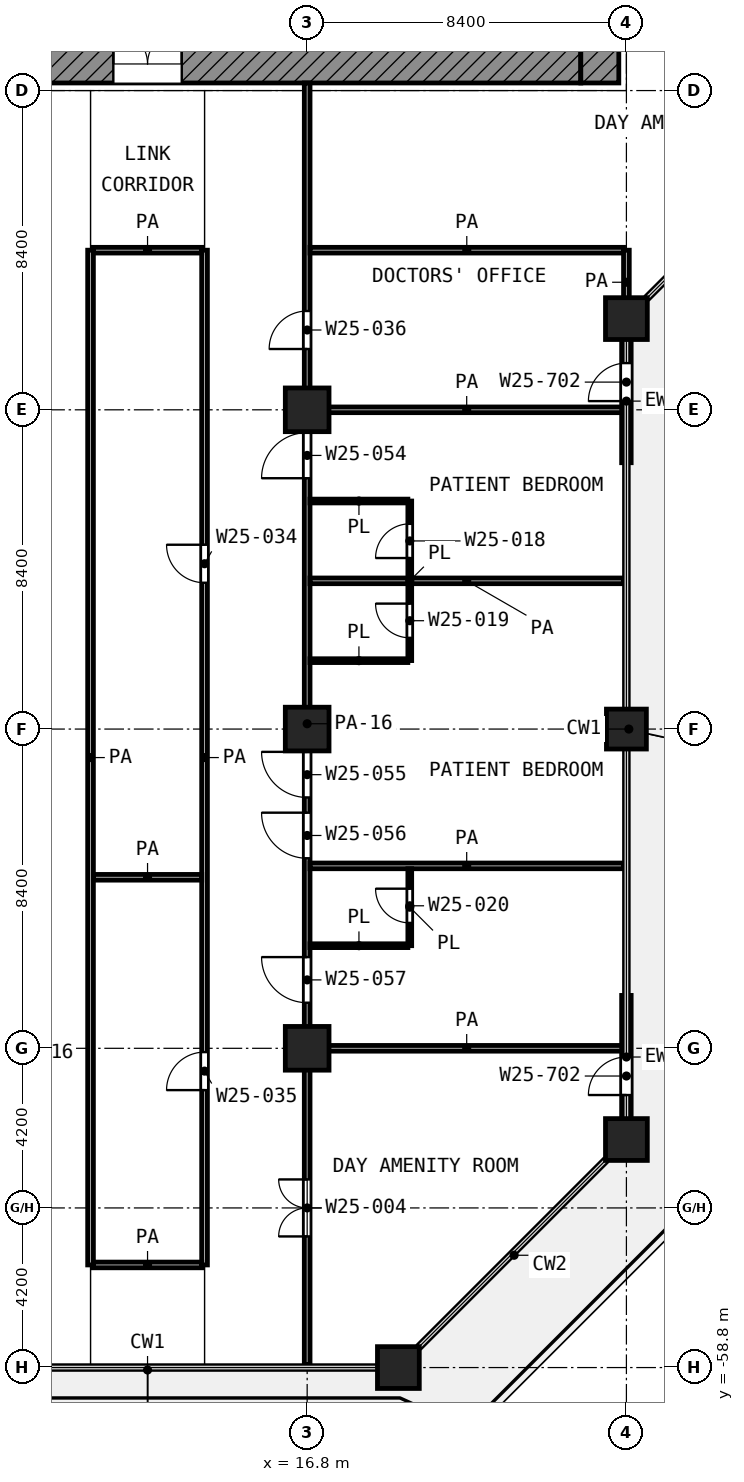
"""IFC4 building model, lengths in metres.
Left out: names, types, materials, properties, quantities, classifications, styles, units other than length and angle.
Written with IfcOpenShell. Run it as: python <this file> out.ifc"""

import sys

from ifc_helpers import new_model, si_unit, direction, frame, frame_2d, origin, origin_2d, place, context, subcontext, project, spatial, rectangle, extrude, element, fill, save


model = new_model("IFC4")
c1 = context("Model", 3, precision=1e-05, world=origin(), true_north=direction((0.0, 1.0)))
c2 = subcontext(c1, "Body", "Model", "MODEL_VIEW")
j1 = project(units=[si_unit("LENGTHUNIT", "METRE"), si_unit("PLANEANGLEUNIT", "RADIAN")], contexts=[c1])
p1 = place(None, origin())
s1 = spatial("IfcSite", under=j1, at=p1, CompositionType="ELEMENT")
p2 = place(p1, origin())
s2 = spatial("IfcBuilding", under=s1, at=p2, CompositionType="ELEMENT")
p3 = place(p2, frame((0.0, 0.0, 111.4)))
s3 = spatial("IfcBuildingStorey", under=s2, at=p3, CompositionType="ELEMENT", Elevation=111.4)
p4 = place(p3, frame((25.2, -31.2, 0.0), z_axis=(0.0, 0.0, 1.0), x_axis=(1.0, 0.0, 0.0)))
e1 = element("IfcColumn", 1, at=p4, inside=s3, PredefinedType="COLUMN", context=c2, shape_type="SweptSolid", body=[
    extrude(rectangle(XDim=1.1, YDim=1.1, at=origin_2d()), origin(), (0.0, 0.0, 1.0), 4.2),
])
for number, where, z_axis, x_axis in (
    (2, (16.8, -33.6, 0.0), (0.0, 0.0, 1.0), (1.0, 0.0, 0.0)),
    (3, (16.8, -42.0, 0.0), (0.0, 0.0, 1.0), (1.0, 0.0, 0.0)),
):
    element("IfcColumn", number, at=place(p3, frame(where, z_axis=z_axis, x_axis=x_axis)), inside=s3, PredefinedType="COLUMN", context=c2, shape_type="SweptSolid", body=[
        extrude(rectangle(XDim=1.15, YDim=1.15, at=origin_2d()), origin(), (0.0, 0.0, 1.0), 4.2),
    ])
p5 = place(p3, frame((25.2, -42.0, 0.0), z_axis=(0.0, 0.0, 1.0), x_axis=(1.0, 0.0, 0.0)))
e4 = element("IfcColumn", 4, at=p5, inside=s3, PredefinedType="COLUMN", context=c2, shape_type="SweptSolid", body=[
    extrude(rectangle(XDim=1.05, YDim=1.05, at=origin_2d()), origin(), (0.0, 0.0, 1.0), 4.2),
])
p6 = place(p3, frame((16.8, -50.4, 0.0), z_axis=(0.0, 0.0, 1.0), x_axis=(1.0, 0.0, 0.0)))
e5 = element("IfcColumn", 5, at=p6, inside=s3, PredefinedType="COLUMN", context=c2, shape_type="SweptSolid", body=[
    extrude(rectangle(XDim=1.15, YDim=1.15, at=origin_2d()), origin(), (0.0, 0.0, 1.0), 4.2),
])
for number, where, z_axis, x_axis in (
    (6, (25.2, -52.8, 0.0), (0.0, 0.0, 1.0), (1.0, 0.0, 0.0)),
    (7, (19.2, -58.8, 0.0), (0.0, 0.0, 1.0), (1.0, 0.0, 0.0)),
):
    element("IfcColumn", number, at=place(p3, frame(where, z_axis=z_axis, x_axis=x_axis)), inside=s3, PredefinedType="COLUMN", context=c2, shape_type="SweptSolid", body=[
        extrude(rectangle(XDim=1.1, YDim=1.1, at=origin_2d()), origin(), (0.0, 0.0, 1.0), 4.2),
    ])
p7 = place(p3, frame((25.2, -52.25, 0.0), z_axis=(0.0, 0.0, 1.0), x_axis=(0.0, 1.0, 0.0)))
e8 = element("IfcWall", 8, at=p7, inside=s3, PredefinedType="SOLIDWALL", context=c2, shape_type="SweptSolid", body=[
    extrude(rectangle(XDim=3.242, YDim=0.25, at=frame_2d((1.621, 0.0))), origin(), (0.0, 0.0, 1.0), 3.48),
])
p8 = place(p7, frame((0.621, 0.0, 0.0)))
e9 = element("IfcOpeningElement", 9, at=p8, cuts=e8, PredefinedType="OPENING", context=c2, shape_type="SweptSolid", body=[
    extrude(rectangle(XDim=1.0, YDim=2.1, at=frame_2d((0.5, 1.05))), frame((0.0, 0.135, 0.0), z_axis=(0.0, -1.0, 0.0), x_axis=(1.0, 0.0, 0.0)), (0.0, 0.0, 1.0), 0.27),
])
p9 = place(p3, frame((25.2, -34.992, 0.0), z_axis=(0.0, 0.0, 1.0), x_axis=(0.0, 1.0, 0.0)))
e10 = element("IfcWall", 10, at=p9, inside=s3, PredefinedType="SOLIDWALL", context=c2, shape_type="SweptSolid", body=[
    extrude(rectangle(XDim=3.242, YDim=0.25, at=frame_2d((1.621, 0.0))), origin(), (0.0, 0.0, 1.0), 3.48),
])
p10 = place(p9, frame((1.621, 0.0, 0.0)))
e11 = element("IfcOpeningElement", 11, at=p10, cuts=e10, PredefinedType="OPENING", context=c2, shape_type="SweptSolid", body=[
    extrude(rectangle(XDim=1.0, YDim=2.1, at=frame_2d((0.5, 1.05))), frame((0.0, 0.135, 0.0), z_axis=(0.0, -1.0, 0.0), x_axis=(1.0, 0.0, 0.0)), (0.0, 0.0, 1.0), 0.27),
])
p11 = place(p3, frame((5.4, -24.5, 0.0), z_axis=(0.0, 0.0, 1.0), x_axis=(1.0, 0.0, 0.0)))
e12 = element("IfcWall", 12, at=p11, inside=s3, PredefinedType="SHEAR", context=c2, shape_type="SweptSolid", body=[
    extrude(rectangle(XDim=18.6, YDim=1.0, at=frame_2d((9.3, 0.0))), origin(), (0.0, 0.0, 1.0), 3.6),
])
p12 = place(p11, frame((6.3, 0.0, 0.0)))
e13 = element("IfcOpeningElement", 13, at=p12, cuts=e12, PredefinedType="OPENING", context=c2, shape_type="SweptSolid", body=[
    extrude(rectangle(XDim=1.8, YDim=2.1, at=frame_2d((0.9, 1.05))), frame((0.0, 0.51, 0.0), z_axis=(0.0, -1.0, 0.0), x_axis=(1.0, 0.0, 0.0)), (0.0, 0.0, 1.0), 1.02),
])
p13 = place(p3, frame((24.5, -25.0, 0.0), z_axis=(0.0, 0.0, 1.0), x_axis=(0.0, 1.0, 0.0)))
e14 = element("IfcWall", 14, at=p13, inside=s3, PredefinedType="SHEAR", context=c2, shape_type="SweptSolid", body=[
    extrude(rectangle(XDim=1.0, YDim=1.0, at=frame_2d((0.5, 0.0))), origin(), (0.0, 0.0, 1.0), 3.6),
])
p14 = place(p3, frame((16.875, -47.7, 0.0), z_axis=(0.0, 0.0, 1.0), x_axis=(1.0, 0.0, 0.0)))
e15 = element("IfcWall", 15, at=p14, inside=s3, PredefinedType="PARTITIONING", context=c2, shape_type="SweptSolid", body=[
    extrude(rectangle(XDim=2.575, YDim=0.1, at=frame_2d((1.288, 0.0))), origin(), (0.0, 0.0, 1.0), 3.6),
])
p15 = place(p3, frame((16.875, -40.2, 0.0), z_axis=(0.0, 0.0, 1.0), x_axis=(1.0, 0.0, 0.0)))
e16 = element("IfcWall", 16, at=p15, inside=s3, PredefinedType="PARTITIONING", context=c2, shape_type="SweptSolid", body=[
    extrude(rectangle(XDim=2.574, YDim=0.1, at=frame_2d((1.287, 0.0))), origin(), (0.0, 0.0, 1.0), 3.6),
])
p16 = place(p3, frame((16.875, -36.0, 0.0), z_axis=(0.0, 0.0, 1.0), x_axis=(1.0, 0.0, 0.0)))
e17 = element("IfcWall", 17, at=p16, inside=s3, PredefinedType="PARTITIONING", context=c2, shape_type="SweptSolid", body=[
    extrude(rectangle(XDim=2.575, YDim=0.1, at=frame_2d((1.288, 0.0))), origin(), (0.0, 0.0, 1.0), 3.6),
])
p17 = place(p3, frame((19.5, -47.7, 0.0), z_axis=(0.0, 0.0, 1.0), x_axis=(0.0, 1.0, 0.0)))
e18 = element("IfcWall", 18, at=p17, inside=s3, PredefinedType="PARTITIONING", context=c2, shape_type="SweptSolid", body=[
    extrude(rectangle(XDim=2.025, YDim=0.1, at=frame_2d((1.012, 0.0))), origin(), (0.0, 0.0, 1.0), 3.6),
])
p18 = place(p17, frame((0.6, 0.0, 0.0)))
e19 = element("IfcOpeningElement", 19, at=p18, cuts=e18, PredefinedType="OPENING", context=c2, shape_type="SweptSolid", body=[
    extrude(rectangle(XDim=0.9, YDim=2.1, at=frame_2d((0.45, 1.05))), frame((0.0, 0.06, 0.0), z_axis=(0.0, -1.0, 0.0), x_axis=(1.0, 0.0, 0.0)), (0.0, 0.0, 1.0), 0.12),
])
p19 = place(p3, frame((19.5, -40.198, 0.0), z_axis=(0.0, 0.0, 1.0), x_axis=(0.0, 1.0, 0.0)))
e20 = element("IfcWall", 20, at=p19, inside=s3, PredefinedType="PARTITIONING", context=c2, shape_type="SweptSolid", body=[
    extrude(rectangle(XDim=4.198, YDim=0.1, at=frame_2d((2.099, 0.0))), origin(), (0.0, 0.0, 1.0), 3.6),
])
p20 = place(p19, frame((2.698, 0.0, 0.0)))
e21 = element("IfcOpeningElement", 21, at=p20, cuts=e20, PredefinedType="OPENING", context=c2, shape_type="SweptSolid", body=[
    extrude(rectangle(XDim=0.9, YDim=2.1, at=frame_2d((0.45, 1.05))), frame((0.0, 0.06, 0.0), z_axis=(0.0, -1.0, 0.0), x_axis=(1.0, 0.0, 0.0)), (0.0, 0.0, 1.0), 0.12),
])
p21 = place(p19, frame((0.599, 0.0, 0.0)))
e22 = element("IfcOpeningElement", 22, at=p21, cuts=e20, PredefinedType="OPENING", context=c2, shape_type="SweptSolid", body=[
    extrude(rectangle(XDim=0.9, YDim=2.1, at=frame_2d((0.45, 1.05))), frame((0.0, 0.06, 0.0), z_axis=(0.0, -1.0, 0.0), x_axis=(1.0, 0.0, 0.0)), (0.0, 0.0, 1.0), 0.12),
])
p22 = place(p3, frame((11.175, -56.1, 0.0), z_axis=(0.0, 0.0, 1.0), x_axis=(1.0, 0.0, 0.0)))
e23 = element("IfcWall", 23, at=p22, inside=s3, PredefinedType="PARTITIONING", context=c2, shape_type="SweptSolid", body=[
    extrude(rectangle(XDim=2.85, YDim=0.15, at=frame_2d((1.425, 0.0))), origin(), (0.0, 0.0, 1.0), 3.6),
])
p23 = place(p3, frame((16.875, -50.4, 0.0), z_axis=(0.0, 0.0, 1.0), x_axis=(1.0, 0.0, 0.0)))
e24 = element("IfcWall", 24, at=p23, inside=s3, PredefinedType="PARTITIONING", context=c2, shape_type="SweptSolid", body=[
    extrude(rectangle(XDim=8.245, YDim=0.15, at=frame_2d((4.123, 0.0))), origin(), (0.0, 0.0, 1.0), 3.6),
])
p24 = place(p3, frame((11.175, -45.9, 0.0), z_axis=(0.0, 0.0, 1.0), x_axis=(1.0, 0.0, 0.0)))
e25 = element("IfcWall", 25, at=p24, inside=s3, PredefinedType="PARTITIONING", context=c2, shape_type="SweptSolid", body=[
    extrude(rectangle(XDim=2.85, YDim=0.15, at=frame_2d((1.425, 0.0))), origin(), (0.0, 0.0, 1.0), 3.6),
])
for number, where, z_axis, x_axis in (
    (26, (16.875, -45.6, 0.0), (0.0, 0.0, 1.0), (1.0, 0.0, 0.0)),
    (27, (16.875, -38.1, 0.0), (0.0, 0.0, 1.0), (1.0, 0.0, 0.0)),
    (28, (16.875, -33.6, 0.0), (0.0, 0.0, 1.0), (1.0, 0.0, 0.0)),
):
    element("IfcWall", number, at=place(p3, frame(where, z_axis=z_axis, x_axis=x_axis)), inside=s3, PredefinedType="PARTITIONING", context=c2, shape_type="SweptSolid", body=[
        extrude(rectangle(XDim=8.245, YDim=0.15, at=frame_2d((4.123, 0.0))), origin(), (0.0, 0.0, 1.0), 3.6),
    ])
p25 = place(p3, frame((11.175, -29.4, 0.0), z_axis=(0.0, 0.0, 1.0), x_axis=(1.0, 0.0, 0.0)))
e29 = element("IfcWall", 29, at=p25, inside=s3, PredefinedType="PARTITIONING", context=c2, shape_type="SweptSolid", body=[
    extrude(rectangle(XDim=2.85, YDim=0.15, at=frame_2d((1.425, 0.0))), origin(), (0.0, 0.0, 1.0), 3.6),
])
p26 = place(p3, frame((16.875, -29.4, 0.0), z_axis=(0.0, 0.0, 1.0), x_axis=(1.0, 0.0, 0.0)))
e30 = element("IfcWall", 30, at=p26, inside=s3, PredefinedType="PARTITIONING", context=c2, shape_type="SweptSolid", body=[
    extrude(rectangle(XDim=8.25, YDim=0.15, at=frame_2d((4.125, 0.0))), origin(), (0.0, 0.0, 1.0), 3.6),
])
p27 = place(p3, frame((11.1, -56.1, 0.0), z_axis=(0.0, 0.0, 1.0), x_axis=(0.0, 1.0, 0.0)))
e31 = element("IfcWall", 31, at=p27, inside=s3, PredefinedType="PARTITIONING", context=c2, shape_type="SweptSolid", body=[
    extrude(rectangle(XDim=26.7, YDim=0.15, at=frame_2d((13.35, 0.0))), origin(), (0.0, 0.0, 1.0), 3.6),
])
p28 = place(p3, frame((14.1, -56.1, 0.0), z_axis=(0.0, 0.0, 1.0), x_axis=(0.0, 1.0, 0.0)))
e32 = element("IfcWall", 32, at=p28, inside=s3, PredefinedType="PARTITIONING", context=c2, shape_type="SweptSolid", body=[
    extrude(rectangle(XDim=26.7, YDim=0.15, at=frame_2d((13.35, 0.0))), origin(), (0.0, 0.0, 1.0), 3.6),
])
p29 = place(p28, frame((17.95, 0.0, 0.0)))
e33 = element("IfcOpeningElement", 33, at=p29, cuts=e32, PredefinedType="OPENING", context=c2, shape_type="SweptSolid", body=[
    extrude(rectangle(XDim=1.0, YDim=2.1, at=frame_2d((0.5, 1.05))), frame((0.0, 0.085, 0.0), z_axis=(0.0, -1.0, 0.0), x_axis=(1.0, 0.0, 0.0)), (0.0, 0.0, 1.0), 0.17),
])
p30 = place(p28, frame((4.6, 0.0, 0.0)))
e34 = element("IfcOpeningElement", 34, at=p30, cuts=e32, PredefinedType="OPENING", context=c2, shape_type="SweptSolid", body=[
    extrude(rectangle(XDim=1.0, YDim=2.1, at=frame_2d((0.5, 1.05))), frame((0.0, 0.085, 0.0), z_axis=(0.0, -1.0, 0.0), x_axis=(1.0, 0.0, 0.0)), (0.0, 0.0, 1.0), 0.17),
])
p31 = place(p3, frame((16.8, -58.72, 0.0), z_axis=(0.0, 0.0, 1.0), x_axis=(0.0, 1.0, 0.0)))
e35 = element("IfcWall", 35, at=p31, inside=s3, PredefinedType="PARTITIONING", context=c2, shape_type="SweptSolid", body=[
    extrude(rectangle(XDim=33.72, YDim=0.15, at=frame_2d((16.86, 0.0))), origin(), (0.0, 0.0, 1.0), 2.7),
])
p32 = place(p31, frame((26.72, 0.0, 0.0)))
e36 = element("IfcOpeningElement", 36, at=p32, cuts=e35, PredefinedType="OPENING", context=c2, shape_type="SweptSolid", body=[
    extrude(rectangle(XDim=1.0, YDim=2.1, at=frame_2d((0.5, 1.05))), frame((0.0, 0.085, 0.0), z_axis=(0.0, -1.0, 0.0), x_axis=(1.0, 0.0, 0.0)), (0.0, 0.0, 1.0), 0.17),
])
p33 = place(p31, frame((23.32, 0.0, 0.0)))
e37 = element("IfcOpeningElement", 37, at=p33, cuts=e35, PredefinedType="OPENING", context=c2, shape_type="SweptSolid", body=[
    extrude(rectangle(XDim=1.2, YDim=2.1, at=frame_2d((0.6, 1.05))), frame((0.0, 0.085, 0.0), z_axis=(0.0, -1.0, 0.0), x_axis=(1.0, 0.0, 0.0)), (0.0, 0.0, 1.0), 0.17),
])
p34 = place(p31, frame((14.92, 0.0, 0.0)))
e38 = element("IfcOpeningElement", 38, at=p34, cuts=e35, PredefinedType="OPENING", context=c2, shape_type="SweptSolid", body=[
    extrude(rectangle(XDim=1.2, YDim=2.1, at=frame_2d((0.6, 1.05))), frame((0.0, 0.085, 0.0), z_axis=(0.0, -1.0, 0.0), x_axis=(1.0, 0.0, 0.0)), (0.0, 0.0, 1.0), 0.17),
])
p35 = place(p31, frame((13.32, 0.0, 0.0)))
e39 = element("IfcOpeningElement", 39, at=p35, cuts=e35, PredefinedType="OPENING", context=c2, shape_type="SweptSolid", body=[
    extrude(rectangle(XDim=1.2, YDim=2.1, at=frame_2d((0.6, 1.05))), frame((0.0, 0.085, 0.0), z_axis=(0.0, -1.0, 0.0), x_axis=(1.0, 0.0, 0.0)), (0.0, 0.0, 1.0), 0.17),
])
p36 = place(p31, frame((9.52, 0.0, 0.0)))
e40 = element("IfcOpeningElement", 40, at=p36, cuts=e35, PredefinedType="OPENING", context=c2, shape_type="SweptSolid", body=[
    extrude(rectangle(XDim=1.2, YDim=2.1, at=frame_2d((0.6, 1.05))), frame((0.0, 0.085, 0.0), z_axis=(0.0, -1.0, 0.0), x_axis=(1.0, 0.0, 0.0)), (0.0, 0.0, 1.0), 0.17),
])
p37 = place(p31, frame((3.37, 0.0, 0.0)))
e41 = element("IfcOpeningElement", 41, at=p37, cuts=e35, PredefinedType="OPENING", context=c2, shape_type="SweptSolid", body=[
    extrude(rectangle(XDim=1.5, YDim=2.1, at=frame_2d((0.75, 1.05))), frame((0.0, 0.085, 0.0), z_axis=(0.0, -1.0, 0.0), x_axis=(1.0, 0.0, 0.0)), (0.0, 0.0, 1.0), 0.17),
])
p38 = place(p3, frame((25.2, -31.087, 0.0), z_axis=(0.0, 0.0, 1.0), x_axis=(0.0, 1.0, 0.0)))
e42 = element("IfcWall", 42, at=p38, inside=s3, PredefinedType="PARTITIONING", context=c2, shape_type="SweptSolid", body=[
    extrude(rectangle(XDim=1.687, YDim=0.15, at=frame_2d((0.844, 0.0))), origin(), (0.0, 0.0, 1.0), 3.6),
])
p39 = place(p8, origin())
e43 = element("IfcDoor", 43, at=p39, inside=s3, OperationType="SINGLE_SWING_LEFT", PredefinedType="DOOR", context=c2, shape_type="SweptSolid", body=[
    extrude(rectangle(XDim=1.0, YDim=2.1, at=frame_2d((0.5, 1.05))), frame((0.0, 0.025, 0.0), z_axis=(0.0, -1.0, 0.0), x_axis=(1.0, 0.0, 0.0)), (0.0, 0.0, 1.0), 0.05),
])
fill(e9, e43)
p40 = place(p10, origin())
e44 = element("IfcDoor", 44, at=p40, inside=s3, OperationType="SINGLE_SWING_LEFT", PredefinedType="DOOR", context=c2, shape_type="SweptSolid", body=[
    extrude(rectangle(XDim=1.0, YDim=2.1, at=frame_2d((0.5, 1.05))), frame((0.0, 0.025, 0.0), z_axis=(0.0, -1.0, 0.0), x_axis=(1.0, 0.0, 0.0)), (0.0, 0.0, 1.0), 0.05),
])
fill(e11, e44)
p41 = place(p12, origin())
e45 = element("IfcDoor", 45, at=p41, inside=s3, OperationType="DOUBLE_DOOR_SINGLE_SWING", PredefinedType="DOOR", context=c2, shape_type="SweptSolid", body=[
    extrude(rectangle(XDim=1.8, YDim=2.1, at=frame_2d((0.9, 1.05))), frame((0.0, 0.025, 0.0), z_axis=(0.0, -1.0, 0.0), x_axis=(1.0, 0.0, 0.0)), (0.0, 0.0, 1.0), 0.05),
])
fill(e13, e45)
p42 = place(p29, origin())
e46 = element("IfcDoor", 46, at=p42, inside=s3, OperationType="SINGLE_SWING_RIGHT", PredefinedType="DOOR", context=c2, shape_type="SweptSolid", body=[
    extrude(rectangle(XDim=1.0, YDim=2.1, at=frame_2d((0.5, 1.05))), frame((0.0, 0.025, 0.0), z_axis=(0.0, -1.0, 0.0), x_axis=(1.0, 0.0, 0.0)), (0.0, 0.0, 1.0), 0.05),
])
fill(e33, e46)
p43 = place(p30, origin())
e47 = element("IfcDoor", 47, at=p43, inside=s3, OperationType="SINGLE_SWING_LEFT", PredefinedType="DOOR", context=c2, shape_type="SweptSolid", body=[
    extrude(rectangle(XDim=1.0, YDim=2.1, at=frame_2d((0.5, 1.05))), frame((0.0, 0.025, 0.0), z_axis=(0.0, -1.0, 0.0), x_axis=(1.0, 0.0, 0.0)), (0.0, 0.0, 1.0), 0.05),
])
fill(e34, e47)
p44 = place(p32, origin())
e48 = element("IfcDoor", 48, at=p44, inside=s3, OperationType="SINGLE_SWING_LEFT", PredefinedType="DOOR", context=c2, shape_type="SweptSolid", body=[
    extrude(rectangle(XDim=1.0, YDim=2.1, at=frame_2d((0.5, 1.05))), frame((0.0, 0.025, 0.0), z_axis=(0.0, -1.0, 0.0), x_axis=(1.0, 0.0, 0.0)), (0.0, 0.0, 1.0), 0.05),
])
fill(e36, e48)
p45 = place(p33, origin())
e49 = element("IfcDoor", 49, at=p45, inside=s3, OperationType="SINGLE_SWING_LEFT", PredefinedType="DOOR", context=c2, shape_type="SweptSolid", body=[
    extrude(rectangle(XDim=1.2, YDim=2.1, at=frame_2d((0.6, 1.05))), frame((0.0, 0.025, 0.0), z_axis=(0.0, -1.0, 0.0), x_axis=(1.0, 0.0, 0.0)), (0.0, 0.0, 1.0), 0.05),
])
fill(e37, e49)
p46 = place(p20, origin())
e50 = element("IfcDoor", 50, at=p46, inside=s3, OperationType="SINGLE_SWING_LEFT", PredefinedType="DOOR", context=c2, shape_type="SweptSolid", body=[
    extrude(rectangle(XDim=0.9, YDim=2.1, at=frame_2d((0.45, 1.05))), frame((0.0, 0.025, 0.0), z_axis=(0.0, -1.0, 0.0), x_axis=(1.0, 0.0, 0.0)), (0.0, 0.0, 1.0), 0.05),
])
fill(e21, e50)
p47 = place(p34, origin())
e51 = element("IfcDoor", 51, at=p47, inside=s3, OperationType="SINGLE_SWING_RIGHT", PredefinedType="DOOR", context=c2, shape_type="SweptSolid", body=[
    extrude(rectangle(XDim=1.2, YDim=2.1, at=frame_2d((0.6, 1.05))), frame((0.0, 0.025, 0.0), z_axis=(0.0, -1.0, 0.0), x_axis=(1.0, 0.0, 0.0)), (0.0, 0.0, 1.0), 0.05),
])
fill(e38, e51)
p48 = place(p35, origin())
e52 = element("IfcDoor", 52, at=p48, inside=s3, OperationType="SINGLE_SWING_RIGHT", PredefinedType="DOOR", context=c2, shape_type="SweptSolid", body=[
    extrude(rectangle(XDim=1.2, YDim=2.1, at=frame_2d((0.6, 1.05))), frame((0.0, 0.025, 0.0), z_axis=(0.0, -1.0, 0.0), x_axis=(1.0, 0.0, 0.0)), (0.0, 0.0, 1.0), 0.05),
])
fill(e39, e52)
p49 = place(p21, origin())
e53 = element("IfcDoor", 53, at=p49, inside=s3, OperationType="SINGLE_SWING_RIGHT", PredefinedType="DOOR", context=c2, shape_type="SweptSolid", body=[
    extrude(rectangle(XDim=0.9, YDim=2.1, at=frame_2d((0.45, 1.05))), frame((0.0, 0.025, 0.0), z_axis=(0.0, -1.0, 0.0), x_axis=(1.0, 0.0, 0.0)), (0.0, 0.0, 1.0), 0.05),
])
fill(e22, e53)
p50 = place(p36, origin())
e54 = element("IfcDoor", 54, at=p50, inside=s3, OperationType="SINGLE_SWING_RIGHT", PredefinedType="DOOR", context=c2, shape_type="SweptSolid", body=[
    extrude(rectangle(XDim=1.2, YDim=2.1, at=frame_2d((0.6, 1.05))), frame((0.0, 0.025, 0.0), z_axis=(0.0, -1.0, 0.0), x_axis=(1.0, 0.0, 0.0)), (0.0, 0.0, 1.0), 0.05),
])
fill(e40, e54)
p51 = place(p18, origin())
e55 = element("IfcDoor", 55, at=p51, inside=s3, OperationType="SINGLE_SWING_RIGHT", PredefinedType="DOOR", context=c2, shape_type="SweptSolid", body=[
    extrude(rectangle(XDim=0.9, YDim=2.1, at=frame_2d((0.45, 1.05))), frame((0.0, 0.025, 0.0), z_axis=(0.0, -1.0, 0.0), x_axis=(1.0, 0.0, 0.0)), (0.0, 0.0, 1.0), 0.05),
])
fill(e19, e55)
p52 = place(p37, origin())
e56 = element("IfcDoor", 56, at=p52, inside=s3, OperationType="DOUBLE_DOOR_SINGLE_SWING", PredefinedType="DOOR", context=c2, shape_type="SweptSolid", body=[
    extrude(rectangle(XDim=1.5, YDim=2.1, at=frame_2d((0.75, 1.05))), frame((0.0, 0.025, 0.0), z_axis=(0.0, -1.0, 0.0), x_axis=(1.0, 0.0, 0.0)), (0.0, 0.0, 1.0), 0.05),
])
fill(e41, e56)
save(model, sys.argv[1])
